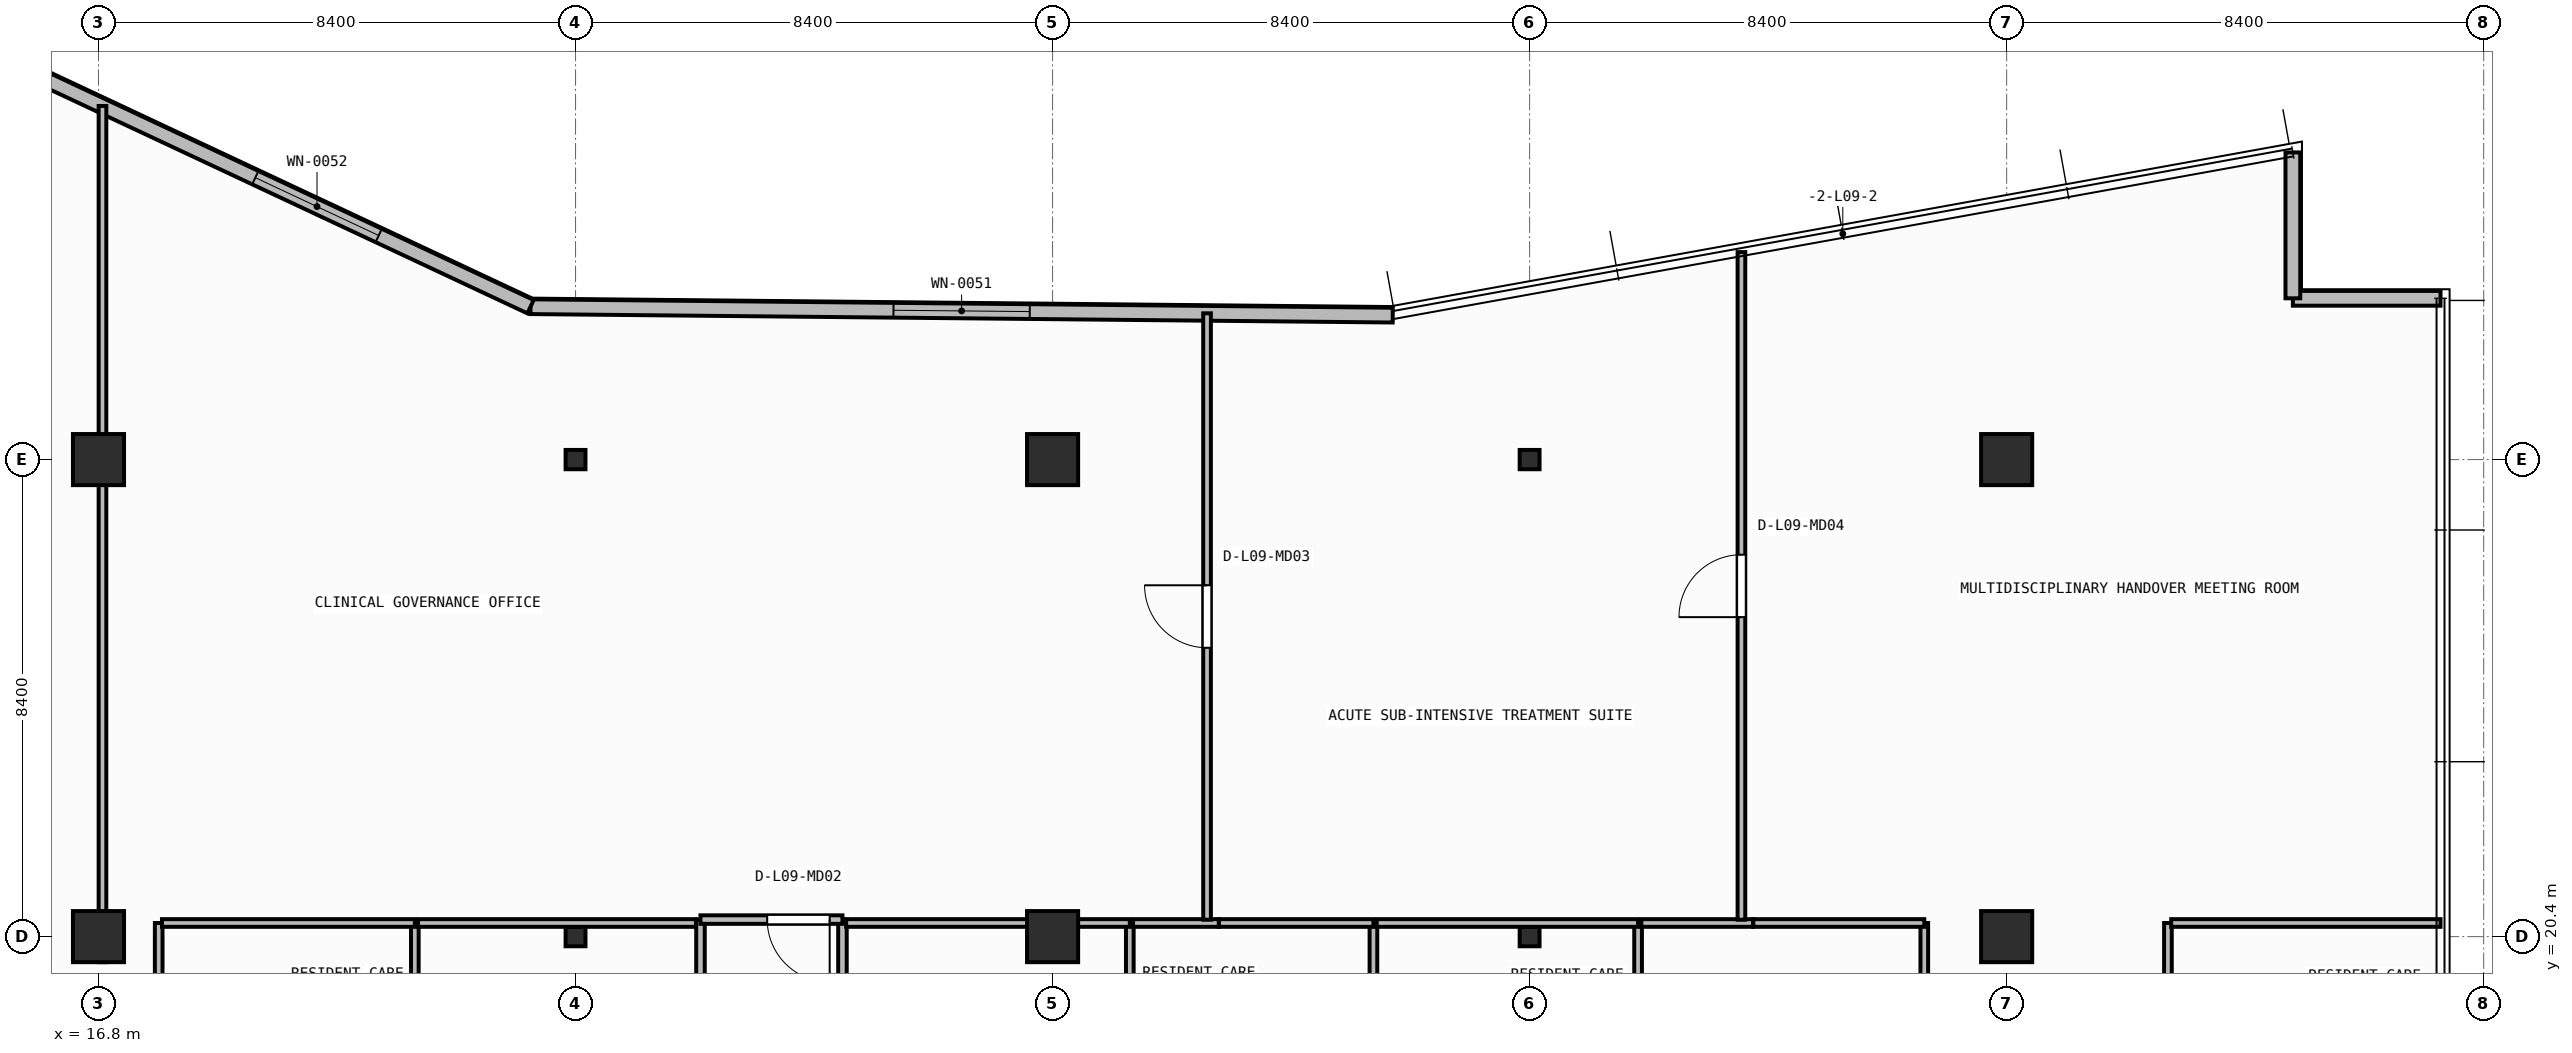
"""IFC4 building model, lengths in metres.
Left out: names, types, materials, properties, quantities, classifications, styles, units other than length and angle.
Written with IfcOpenShell. Run it as: python <this file> out.ifc"""

import sys

from ifc_helpers import new_model, si_unit, direction, frame, frame_2d, origin, origin_2d, place, context, subcontext, project, spatial, rectangle, i_section, extrude, element, fill, save


model = new_model("IFC4")
c1 = context("Model", 3, precision=1e-05, world=origin(), true_north=direction((0.0, 1.0)))
c2 = subcontext(c1, "Body", "Model", "MODEL_VIEW")
j1 = project(units=[si_unit("LENGTHUNIT", "METRE"), si_unit("PLANEANGLEUNIT", "RADIAN")], contexts=[c1])
p1 = place(None, origin())
s1 = spatial("IfcSite", under=j1, at=p1, CompositionType="ELEMENT")
p2 = place(p1, origin())
s2 = spatial("IfcBuilding", under=s1, at=p2, CompositionType="ELEMENT")
p3 = place(p2, frame((0.0, 0.0, 38.3)))
s3 = spatial("IfcBuildingStorey", under=s2, at=p3, CompositionType="ELEMENT", Elevation=38.3)
p4 = place(p3, frame((16.8, 20.4, 0.0), z_axis=(0.0, 0.0, 1.0), x_axis=(1.0, 0.0, 0.0)))
e1 = element("IfcColumn", 1, at=p4, inside=s3, PredefinedType="COLUMN", context=c2, shape_type="SweptSolid", body=[
    extrude(rectangle(XDim=0.9, YDim=0.9, at=origin_2d()), origin(), (0.0, 0.0, 1.0), 3.95),
])
p5 = place(p3, frame((25.2, 20.4, 0.0), z_axis=(0.0, 0.0, 1.0), x_axis=(1.0, 0.0, 0.0)))
e2 = element("IfcColumn", 2, at=p5, inside=s3, PredefinedType="COLUMN", context=c2, shape_type="SweptSolid", body=[
    extrude(i_section(OverallWidth=0.35, OverallDepth=0.34, WebThickness=0.016, FlangeThickness=0.028, at=origin_2d()), origin(), (0.0, 0.0, 1.0), 3.95),
])
p6 = place(p3, frame((33.6, 20.4, 0.0), z_axis=(0.0, 0.0, 1.0), x_axis=(1.0, 0.0, 0.0)))
e3 = element("IfcColumn", 3, at=p6, inside=s3, PredefinedType="COLUMN", context=c2, shape_type="SweptSolid", body=[
    extrude(rectangle(XDim=0.9, YDim=0.9, at=origin_2d()), origin(), (0.0, 0.0, 1.0), 3.95),
])
p7 = place(p3, frame((42.0, 20.4, 0.0), z_axis=(0.0, 0.0, 1.0), x_axis=(1.0, 0.0, 0.0)))
e4 = element("IfcColumn", 4, at=p7, inside=s3, PredefinedType="COLUMN", context=c2, shape_type="SweptSolid", body=[
    extrude(i_section(OverallWidth=0.35, OverallDepth=0.34, WebThickness=0.016, FlangeThickness=0.028, at=origin_2d()), origin(), (0.0, 0.0, 1.0), 3.95),
])
for number, where, z_axis, x_axis in (
    (5, (50.4, 20.4, 0.0), (0.0, 0.0, 1.0), (1.0, 0.0, 0.0)),
    (6, (16.8, 28.8, 0.0), (0.0, 0.0, 1.0), (1.0, 0.0, 0.0)),
):
    element("IfcColumn", number, at=place(p3, frame(where, z_axis=z_axis, x_axis=x_axis)), inside=s3, PredefinedType="COLUMN", context=c2, shape_type="SweptSolid", body=[
        extrude(rectangle(XDim=0.9, YDim=0.9, at=origin_2d()), origin(), (0.0, 0.0, 1.0), 3.95),
    ])
p8 = place(p3, frame((25.2, 28.8, 0.0), z_axis=(0.0, 0.0, 1.0), x_axis=(1.0, 0.0, 0.0)))
e7 = element("IfcColumn", 7, at=p8, inside=s3, PredefinedType="COLUMN", context=c2, shape_type="SweptSolid", body=[
    extrude(i_section(OverallWidth=0.35, OverallDepth=0.34, WebThickness=0.016, FlangeThickness=0.028, at=origin_2d()), origin(), (0.0, 0.0, 1.0), 3.95),
])
p9 = place(p3, frame((33.6, 28.8, 0.0), z_axis=(0.0, 0.0, 1.0), x_axis=(1.0, 0.0, 0.0)))
e8 = element("IfcColumn", 8, at=p9, inside=s3, PredefinedType="COLUMN", context=c2, shape_type="SweptSolid", body=[
    extrude(rectangle(XDim=0.9, YDim=0.9, at=origin_2d()), origin(), (0.0, 0.0, 1.0), 3.95),
])
p10 = place(p3, frame((42.0, 28.8, 0.0), z_axis=(0.0, 0.0, 1.0), x_axis=(1.0, 0.0, 0.0)))
e9 = element("IfcColumn", 9, at=p10, inside=s3, PredefinedType="COLUMN", context=c2, shape_type="SweptSolid", body=[
    extrude(i_section(OverallWidth=0.35, OverallDepth=0.34, WebThickness=0.016, FlangeThickness=0.028, at=origin_2d()), origin(), (0.0, 0.0, 1.0), 3.95),
])
p11 = place(p3, frame((50.4, 28.8, 0.0), z_axis=(0.0, 0.0, 1.0), x_axis=(1.0, 0.0, 0.0)))
e10 = element("IfcColumn", 10, at=p11, inside=s3, PredefinedType="COLUMN", context=c2, shape_type="SweptSolid", body=[
    extrude(rectangle(XDim=0.9, YDim=0.9, at=origin_2d()), origin(), (0.0, 0.0, 1.0), 3.95),
])
p12 = place(p3, frame((58.04, 31.64, 0.0), z_axis=(0.0, 0.0, 1.0), x_axis=(-1.0, 0.0, 0.0)))
e11 = element("IfcWall", 11, at=p12, inside=s3, PredefinedType="STANDARD", context=c2, shape_type="SweptSolid", body=[
    extrude(rectangle(XDim=2.6, YDim=0.26, at=frame_2d((1.3, 0.0))), origin(), (0.0, 0.0, 1.0), 3.71),
])
p13 = place(p3, frame((55.44, 31.64, 0.0), z_axis=(0.0, 0.0, 1.0), x_axis=(0.0, 1.0, 0.0)))
e12 = element("IfcWall", 12, at=p13, inside=s3, PredefinedType="STANDARD", context=c2, shape_type="SweptSolid", body=[
    extrude(rectangle(XDim=2.569, YDim=0.26, at=frame_2d((1.284, 0.0))), origin(), (0.0, 0.0, 1.0), 3.71),
])
p14 = place(p3, frame((39.59, 31.344, 0.0), z_axis=(0.0, 0.0, 1.0), x_axis=(-0.999952362926, 0.009760731435, 0.0)))
e13 = element("IfcWall", 13, at=p14, inside=s3, PredefinedType="STANDARD", context=c2, shape_type="SweptSolid", body=[
    extrude(rectangle(XDim=15.183, YDim=0.26, at=frame_2d((7.591, 0.0))), origin(), (0.0, 0.0, 1.0), 3.71),
])
p15 = place(p14, frame((6.391, 0.0, 0.9)))
e14 = element("IfcOpeningElement", 14, at=p15, cuts=e13, PredefinedType="OPENING", context=c2, shape_type="SweptSolid", body=[
    extrude(rectangle(XDim=2.4, YDim=1.65, at=frame_2d((1.2, 0.825))), frame((0.0, 0.14, 0.0), z_axis=(0.0, -1.0, 0.0), x_axis=(1.0, 0.0, 0.0)), (0.0, 0.0, 1.0), 0.28),
])
p16 = place(p3, frame((24.408, 31.492, 0.0), z_axis=(0.0, 0.0, 1.0), x_axis=(-0.905396522918, 0.424566998585, 0.0)))
e15 = element("IfcWall", 15, at=p16, inside=s3, PredefinedType="STANDARD", context=c2, shape_type="SweptSolid", body=[
    extrude(rectangle(XDim=14.189, YDim=0.26, at=frame_2d((7.095, 0.0))), origin(), (0.0, 0.0, 1.0), 3.71),
])
p17 = place(p16, frame((2.953, 0.0, 0.9)))
e16 = element("IfcOpeningElement", 16, at=p17, cuts=e15, PredefinedType="OPENING", context=c2, shape_type="SweptSolid", body=[
    extrude(rectangle(XDim=2.4, YDim=1.65, at=frame_2d((1.2, 0.825))), frame((0.0, 0.14, 0.0), z_axis=(0.0, -1.0, 0.0), x_axis=(1.0, 0.0, 0.0)), (0.0, 0.0, 1.0), 0.28),
])
p18 = place(p3, frame((27.4, 20.7, 0.0), z_axis=(0.0, 0.0, 1.0), x_axis=(0.0, -1.0, 0.0)))
e17 = element("IfcWall", 17, at=p18, inside=s3, PredefinedType="PARTITIONING", context=c2, shape_type="SweptSolid", body=[
    extrude(rectangle(XDim=6.0, YDim=0.15, at=frame_2d((3.0, 0.0))), origin(), (0.0, 0.0, 1.0), 3.71),
])
p19 = place(p3, frame((29.9, 17.814, 0.0), z_axis=(0.0, 0.0, 1.0), x_axis=(0.0, 1.0, 0.0)))
e18 = element("IfcWall", 18, at=p19, inside=s3, PredefinedType="PARTITIONING", context=c2, shape_type="SweptSolid", body=[
    extrude(rectangle(XDim=2.886, YDim=0.15, at=frame_2d((1.443, 0.0))), origin(), (0.0, 0.0, 1.0), 3.71),
])
p20 = place(p3, frame((29.9, 20.7, 0.0), z_axis=(0.0, 0.0, 1.0), x_axis=(-1.0, 0.0, 0.0)))
e19 = element("IfcWall", 19, at=p20, inside=s3, PredefinedType="PARTITIONING", context=c2, shape_type="SweptSolid", body=[
    extrude(rectangle(XDim=2.5, YDim=0.15, at=frame_2d((1.25, 0.0))), origin(), (0.0, 0.0, 1.0), 3.073),
])
p21 = place(p20, frame((0.225, 0.0, 0.0)))
e20 = element("IfcOpeningElement", 20, at=p21, cuts=e19, PredefinedType="OPENING", context=c2, shape_type="SweptSolid", body=[
    extrude(rectangle(XDim=1.1, YDim=2.1, at=frame_2d((0.55, 1.05))), frame((0.0, 0.085, 0.0), z_axis=(0.0, -1.0, 0.0), x_axis=(1.0, 0.0, 0.0)), (0.0, 0.0, 1.0), 0.17),
])
for number, where, z_axis, x_axis in (
    (21, (17.86, 17.833, 0.0), (0.0, 0.0, 1.0), (0.0, 1.0, 0.0)),
    (22, (22.37, 17.833, 0.0), (0.0, 0.0, 1.0), (0.0, 1.0, 0.0)),
):
    element("IfcWall", number, at=place(p3, frame(where, z_axis=z_axis, x_axis=x_axis)), inside=s3, PredefinedType="PARTITIONING", context=c2, shape_type="SweptSolid", body=[
        extrude(rectangle(XDim=2.807, YDim=0.135, at=frame_2d((1.404, 0.0))), origin(), (0.0, 0.0, 1.0), 3.71),
    ])
p22 = place(p3, frame((22.37, 20.64, 0.0), z_axis=(0.0, 0.0, 1.0), x_axis=(-1.0, 0.0, 0.0)))
e23 = element("IfcWall", 23, at=p22, inside=s3, PredefinedType="PARTITIONING", context=c2, shape_type="SweptSolid", body=[
    extrude(rectangle(XDim=4.453, YDim=0.135, at=frame_2d((2.226, 0.0))), origin(), (0.0, 0.0, 1.0), 3.073),
])
p23 = place(p3, frame((27.32, 20.64, 0.0), z_axis=(0.0, 0.0, 1.0), x_axis=(-1.0, 0.0, 0.0)))
e24 = element("IfcWall", 24, at=p23, inside=s3, PredefinedType="PARTITIONING", context=c2, shape_type="SweptSolid", body=[
    extrude(rectangle(XDim=4.893, YDim=0.135, at=frame_2d((2.446, 0.0))), origin(), (0.0, 0.0, 1.0), 3.073),
])
p24 = place(p3, frame((34.96, 17.833, 0.0), z_axis=(0.0, 0.0, 1.0), x_axis=(0.0, 1.0, 0.0)))
e25 = element("IfcWall", 25, at=p24, inside=s3, PredefinedType="PARTITIONING", context=c2, shape_type="SweptSolid", body=[
    extrude(rectangle(XDim=2.807, YDim=0.135, at=frame_2d((1.404, 0.0))), origin(), (0.0, 0.0, 1.0), 3.71),
])
p25 = place(p3, frame((34.96, 20.64, 0.0), z_axis=(0.0, 0.0, 1.0), x_axis=(-1.0, 0.0, 0.0)))
e26 = element("IfcWall", 26, at=p25, inside=s3, PredefinedType="PARTITIONING", context=c2, shape_type="SweptSolid", body=[
    extrude(rectangle(XDim=4.995, YDim=0.135, at=frame_2d((2.498, 0.0))), origin(), (0.0, 0.0, 1.0), 3.073),
])
p26 = place(p3, frame((39.25, 17.833, 0.0), z_axis=(0.0, 0.0, 1.0), x_axis=(0.0, 1.0, 0.0)))
e27 = element("IfcWall", 27, at=p26, inside=s3, PredefinedType="PARTITIONING", context=c2, shape_type="SweptSolid", body=[
    extrude(rectangle(XDim=2.807, YDim=0.135, at=frame_2d((1.404, 0.0))), origin(), (0.0, 0.0, 1.0), 3.71),
])
p27 = place(p3, frame((36.528, 20.64, 0.0), z_axis=(0.0, 0.0, 1.0), x_axis=(-1.0, 0.0, 0.0)))
e28 = element("IfcWall", 28, at=p27, inside=s3, PredefinedType="PARTITIONING", context=c2, shape_type="SweptSolid", body=[
    extrude(rectangle(XDim=1.51, YDim=0.135, at=frame_2d((0.755, 0.0))), origin(), (0.0, 0.0, 1.0), 3.073),
])
p28 = place(p3, frame((39.25, 20.64, 0.0), z_axis=(0.0, 0.0, 1.0), x_axis=(-1.0, 0.0, 0.0)))
e29 = element("IfcWall", 29, at=p28, inside=s3, PredefinedType="PARTITIONING", context=c2, shape_type="SweptSolid", body=[
    extrude(rectangle(XDim=2.72, YDim=0.135, at=frame_2d((1.36, 0.0))), origin(), (0.0, 0.0, 1.0), 3.073),
])
p29 = place(p3, frame((43.91, 17.833, 0.0), z_axis=(0.0, 0.0, 1.0), x_axis=(0.0, 1.0, 0.0)))
e30 = element("IfcWall", 30, at=p29, inside=s3, PredefinedType="PARTITIONING", context=c2, shape_type="SweptSolid", body=[
    extrude(rectangle(XDim=2.807, YDim=0.135, at=frame_2d((1.404, 0.0))), origin(), (0.0, 0.0, 1.0), 3.71),
])
p30 = place(p3, frame((43.91, 20.64, 0.0), z_axis=(0.0, 0.0, 1.0), x_axis=(-1.0, 0.0, 0.0)))
e31 = element("IfcWall", 31, at=p30, inside=s3, PredefinedType="PARTITIONING", context=c2, shape_type="SweptSolid", body=[
    extrude(rectangle(XDim=4.602, YDim=0.135, at=frame_2d((2.301, 0.0))), origin(), (0.0, 0.0, 1.0), 3.073),
])
p31 = place(p3, frame((48.95, 17.833, 0.0), z_axis=(0.0, 0.0, 1.0), x_axis=(0.0, 1.0, 0.0)))
e32 = element("IfcWall", 32, at=p31, inside=s3, PredefinedType="PARTITIONING", context=c2, shape_type="SweptSolid", body=[
    extrude(rectangle(XDim=2.807, YDim=0.135, at=frame_2d((1.404, 0.0))), origin(), (0.0, 0.0, 1.0), 3.71),
])
p32 = place(p3, frame((45.938, 20.64, 0.0), z_axis=(0.0, 0.0, 1.0), x_axis=(-1.0, 0.0, 0.0)))
e33 = element("IfcWall", 33, at=p32, inside=s3, PredefinedType="PARTITIONING", context=c2, shape_type="SweptSolid", body=[
    extrude(rectangle(XDim=1.97, YDim=0.135, at=frame_2d((0.985, 0.0))), origin(), (0.0, 0.0, 1.0), 3.073),
])
p33 = place(p3, frame((48.95, 20.64, 0.0), z_axis=(0.0, 0.0, 1.0), x_axis=(-1.0, 0.0, 0.0)))
e34 = element("IfcWall", 34, at=p33, inside=s3, PredefinedType="PARTITIONING", context=c2, shape_type="SweptSolid", body=[
    extrude(rectangle(XDim=3.01, YDim=0.135, at=frame_2d((1.505, 0.0))), origin(), (0.0, 0.0, 1.0), 3.073),
])
p34 = place(p3, frame((53.24, 17.833, 0.0), z_axis=(0.0, 0.0, 1.0), x_axis=(0.0, 1.0, 0.0)))
e35 = element("IfcWall", 35, at=p34, inside=s3, PredefinedType="PARTITIONING", context=c2, shape_type="SweptSolid", body=[
    extrude(rectangle(XDim=2.807, YDim=0.135, at=frame_2d((1.404, 0.0))), origin(), (0.0, 0.0, 1.0), 3.71),
])
p35 = place(p3, frame((58.04, 20.64, 0.0), z_axis=(0.0, 0.0, 1.0), x_axis=(-1.0, 0.0, 0.0)))
e36 = element("IfcWall", 36, at=p35, inside=s3, PredefinedType="PARTITIONING", context=c2, shape_type="SweptSolid", body=[
    extrude(rectangle(XDim=4.742, YDim=0.135, at=frame_2d((2.371, 0.0))), origin(), (0.0, 0.0, 1.0), 3.71),
])
p36 = place(p3, frame((16.87, 19.95, 0.0), z_axis=(0.0, 0.0, 1.0), x_axis=(0.0, 1.0, 0.0)))
e37 = element("IfcWall", 37, at=p36, inside=s3, PredefinedType="PARTITIONING", context=c2, shape_type="SweptSolid", body=[
    extrude(rectangle(XDim=15.077, YDim=0.135, at=frame_2d((7.539, 0.0))), origin(), (0.0, 0.0, 1.0), 3.073),
])
p37 = place(p3, frame((36.32, 20.698, 0.0), z_axis=(0.0, 0.0, 1.0), x_axis=(0.0, 1.0, 0.0)))
e38 = element("IfcWall", 38, at=p37, inside=s3, PredefinedType="PARTITIONING", context=c2, shape_type="SweptSolid", body=[
    extrude(rectangle(XDim=10.678, YDim=0.135, at=frame_2d((5.339, 0.0))), origin(), (0.0, 0.0, 1.0), 3.71),
])
p38 = place(p37, frame((4.789, 0.0, 0.0)))
e39 = element("IfcOpeningElement", 39, at=p38, cuts=e38, PredefinedType="OPENING", context=c2, shape_type="SweptSolid", body=[
    extrude(rectangle(XDim=1.1, YDim=2.1, at=frame_2d((0.55, 1.05))), frame((0.0, 0.077, 0.0), z_axis=(0.0, -1.0, 0.0), x_axis=(1.0, 0.0, 0.0)), (0.0, 0.0, 1.0), 0.155),
])
p39 = place(p3, frame((45.73, 20.698, 0.0), z_axis=(0.0, 0.0, 1.0), x_axis=(0.0, 1.0, 0.0)))
e40 = element("IfcWall", 40, at=p39, inside=s3, PredefinedType="PARTITIONING", context=c2, shape_type="SweptSolid", body=[
    extrude(rectangle(XDim=11.756, YDim=0.135, at=frame_2d((5.878, 0.0))), origin(), (0.0, 0.0, 1.0), 3.71),
])
p40 = place(p39, frame((5.328, 0.0, 0.0)))
e41 = element("IfcOpeningElement", 41, at=p40, cuts=e40, PredefinedType="OPENING", context=c2, shape_type="SweptSolid", body=[
    extrude(rectangle(XDim=1.1, YDim=2.1, at=frame_2d((0.55, 1.05))), frame((0.0, 0.077, 0.0), z_axis=(0.0, -1.0, 0.0), x_axis=(1.0, 0.0, 0.0)), (0.0, 0.0, 1.0), 0.155),
])
p41 = place(p15, origin())
e42 = element("IfcWindow", 42, at=p41, inside=s3, PartitioningType="SINGLE_PANEL", PredefinedType="WINDOW", context=c2, shape_type="SweptSolid", body=[
    extrude(rectangle(XDim=2.4, YDim=1.65, at=frame_2d((1.2, 0.825))), frame((0.0, 0.03, 0.0), z_axis=(0.0, -1.0, 0.0), x_axis=(1.0, 0.0, 0.0)), (0.0, 0.0, 1.0), 0.06),
])
fill(e14, e42)
p42 = place(p17, origin())
e43 = element("IfcWindow", 43, at=p42, inside=s3, PartitioningType="SINGLE_PANEL", PredefinedType="WINDOW", context=c2, shape_type="SweptSolid", body=[
    extrude(rectangle(XDim=2.4, YDim=1.65, at=frame_2d((1.2, 0.825))), frame((0.0, 0.03, 0.0), z_axis=(0.0, -1.0, 0.0), x_axis=(1.0, 0.0, 0.0)), (0.0, 0.0, 1.0), 0.06),
])
fill(e16, e43)
p43 = place(p21, origin())
e44 = element("IfcDoor", 44, at=p43, inside=s3, OperationType="SINGLE_SWING_LEFT", PredefinedType="DOOR", context=c2, shape_type="SweptSolid", body=[
    extrude(rectangle(XDim=1.1, YDim=2.1, at=frame_2d((0.55, 1.05))), frame((0.0, 0.025, 0.0), z_axis=(0.0, -1.0, 0.0), x_axis=(1.0, 0.0, 0.0)), (0.0, 0.0, 1.0), 0.05),
])
fill(e20, e44)
p44 = place(p38, origin())
e45 = element("IfcDoor", 45, at=p44, inside=s3, OperationType="SINGLE_SWING_RIGHT", PredefinedType="DOOR", context=c2, shape_type="SweptSolid", body=[
    extrude(rectangle(XDim=1.1, YDim=2.1, at=frame_2d((0.55, 1.05))), frame((0.0, 0.025, 0.0), z_axis=(0.0, -1.0, 0.0), x_axis=(1.0, 0.0, 0.0)), (0.0, 0.0, 1.0), 0.05),
])
fill(e39, e45)
p45 = place(p40, origin())
e46 = element("IfcDoor", 46, at=p45, inside=s3, OperationType="SINGLE_SWING_LEFT", PredefinedType="DOOR", context=c2, shape_type="SweptSolid", body=[
    extrude(rectangle(XDim=1.1, YDim=2.1, at=frame_2d((0.55, 1.05))), frame((0.0, 0.025, 0.0), z_axis=(0.0, -1.0, 0.0), x_axis=(1.0, 0.0, 0.0)), (0.0, 0.0, 1.0), 0.05),
])
fill(e41, e46)
save(model, sys.argv[1])
